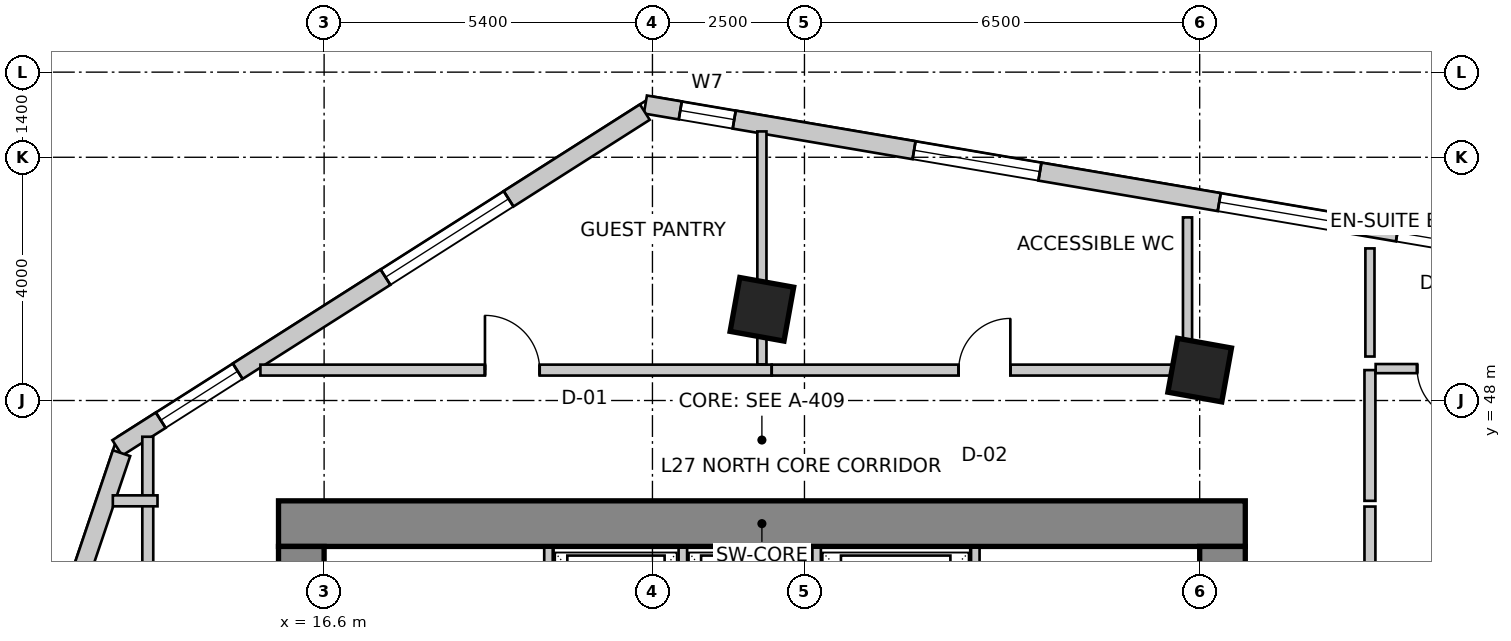
"""IFC4 building model, lengths in metres.
Left out: names, types, materials, properties, quantities, classifications, styles, units other than length and angle.
Written with IfcOpenShell. Run it as: python <this file> out.ifc"""

import sys

from ifc_helpers import new_model, si_unit, direction, frame, frame_2d, origin, origin_2d, place, context, subcontext, project, spatial, rectangle, extrude, source, transform, mapped, element, fill, save


model = new_model("IFC4")
c1 = context("Model", 3, precision=1e-05, world=origin(), true_north=direction((0.0, 1.0)))
c2 = subcontext(c1, "Body", "Model", "MODEL_VIEW")
j1 = project(units=[si_unit("LENGTHUNIT", "METRE"), si_unit("PLANEANGLEUNIT", "RADIAN")], contexts=[c1])
p1 = place(None, origin())
s1 = spatial("IfcSite", under=j1, at=p1, CompositionType="ELEMENT")
p2 = place(p1, origin())
s2 = spatial("IfcBuilding", under=s1, at=p2, CompositionType="ELEMENT")
p3 = place(p2, frame((0.0, 0.0, 114.2)))
s3 = spatial("IfcBuildingStorey", under=s2, at=p3, CompositionType="ELEMENT", Elevation=114.2)
p4 = place(p3, frame((15.85, 45.975, 0.0), z_axis=(0.0, 0.0, 1.0), x_axis=(1.0, 0.0, 0.0)))
e1 = element("IfcWall", 1, at=p4, inside=s3, PredefinedType="SHEAR", context=c2, shape_type="SweptSolid", body=[
    extrude(rectangle(XDim=15.9, YDim=0.75, at=frame_2d((7.95, 0.0))), origin(), (0.0, 0.0, 1.0), 3.6),
])
p5 = place(p3, frame((16.225, 34.2, 0.0), z_axis=(0.0, 0.0, 1.0), x_axis=(0.0, 1.0, 0.0)))
e2 = element("IfcWall", 2, at=p5, inside=s3, PredefinedType="SHEAR", context=c2, shape_type="SweptSolid", body=[
    extrude(rectangle(XDim=11.4, YDim=0.75, at=frame_2d((5.7, 0.0))), origin(), (0.0, 0.0, 1.0), 3.6),
])
m1 = source(origin(), c2, "Body", "SweptSolid", [
    extrude(rectangle(XDim=1.1, YDim=2.15, at=frame_2d((0.55, 1.075))), frame((0.0, 0.385, 0.0), z_axis=(0.0, -1.0, 0.0), x_axis=(1.0, 0.0, 0.0)), (0.0, 0.0, 1.0), 0.77),
])
p6 = place(p5, frame((7.15, 0.0, 0.0)))
e3 = element("IfcOpeningElement", 3, at=p6, cuts=e2, PredefinedType="OPENING", context=c2, shape_type="MappedRepresentation", body=[
    mapped(m1, transform((0.0, 0.0, 0.0), scale=1.0)),
])
p7 = place(p3, frame((31.375, 34.2, 0.0), z_axis=(0.0, 0.0, 1.0), x_axis=(0.0, 1.0, 0.0)))
e4 = element("IfcWall", 4, at=p7, inside=s3, PredefinedType="SHEAR", context=c2, shape_type="SweptSolid", body=[
    extrude(rectangle(XDim=11.4, YDim=0.75, at=frame_2d((5.7, 0.0))), origin(), (0.0, 0.0, 1.0), 3.6),
])
p8 = place(p7, frame((7.35, 0.0, 0.0)))
e5 = element("IfcOpeningElement", 5, at=p8, cuts=e4, PredefinedType="OPENING", context=c2, shape_type="MappedRepresentation", body=[
    mapped(m1, transform((0.0, 0.0, 0.0), scale=1.0)),
])
m2 = source(origin(), c2, "Body", "SweptSolid", [
    extrude(rectangle(XDim=0.9, YDim=0.9, at=origin_2d()), origin(), (0.0, 0.0, 1.0), 3.6),
])
for number, where, z_axis, x_axis in (
    (6, (23.8, 49.5, 0.0), (0.0, 0.0, 1.0), (0.984, -0.177, 0.0)),
    (7, (31.0, 48.5, 0.0), (0.0, 0.0, 1.0), (0.984, -0.177, 0.0)),
):
    element("IfcColumn", number, at=place(p3, frame(where, z_axis=z_axis, x_axis=x_axis)), inside=s3, PredefinedType="COLUMN", context=c2, shape_type="MappedRepresentation", body=[
        mapped(m2, transform((0.0, 0.0, 0.0), scale=1.0)),
    ])
p9 = place(p3, frame((53.561, 47.48, 0.0), z_axis=(0.0, 0.0, 1.0), x_axis=(-0.985845173895, 0.167658262868, 0.0)))
e8 = element("IfcWall", 8, at=p9, inside=s3, PredefinedType="SOLIDWALL", context=c2, shape_type="SweptSolid", body=[
    extrude(rectangle(XDim=32.132, YDim=0.3, at=frame_2d((16.066, 0.0))), origin(), (0.0, 0.0, 1.0), 3.35),
])
m3 = source(origin(), c2, "Body", "SweptSolid", [
    extrude(rectangle(XDim=2.1, YDim=2.0, at=frame_2d((1.05, 1.0))), frame((0.0, 0.16, 0.0), z_axis=(0.0, -1.0, 0.0), x_axis=(1.0, 0.0, 0.0)), (0.0, 0.0, 1.0), 0.32),
])
p10 = place(p9, frame((1.032, 0.0, 0.85)))
e9 = element("IfcOpeningElement", 9, at=p10, cuts=e8, PredefinedType="OPENING", context=c2, shape_type="MappedRepresentation", body=[
    mapped(m3, transform((0.0, 0.0, 0.0), scale=1.0)),
])
p11 = place(p9, frame((4.504, 0.0, 0.85)))
e10 = element("IfcOpeningElement", 10, at=p11, cuts=e8, PredefinedType="OPENING", context=c2, shape_type="MappedRepresentation", body=[
    mapped(m3, transform((0.0, 0.0, 0.0), scale=1.0)),
])
m4 = source(origin(), c2, "Body", "SweptSolid", [
    extrude(rectangle(XDim=1.5, YDim=1.8, at=frame_2d((0.75, 0.9))), frame((0.0, 0.16, 0.0), z_axis=(0.0, -1.0, 0.0), x_axis=(1.0, 0.0, 0.0)), (0.0, 0.0, 1.0), 0.32),
])
p12 = place(p9, frame((7.464, 0.0, 0.85)))
e11 = element("IfcOpeningElement", 11, at=p12, cuts=e8, PredefinedType="OPENING", context=c2, shape_type="MappedRepresentation", body=[
    mapped(m4, transform((0.0, 0.0, 0.0), scale=1.0)),
])
p13 = place(p9, frame((9.824, 0.0, 0.85)))
e12 = element("IfcOpeningElement", 12, at=p13, cuts=e8, PredefinedType="OPENING", context=c2, shape_type="MappedRepresentation", body=[
    mapped(m3, transform((0.0, 0.0, 0.0), scale=1.0)),
])
p14 = place(p9, frame((12.784, 0.0, 0.85)))
e13 = element("IfcOpeningElement", 13, at=p14, cuts=e8, PredefinedType="OPENING", context=c2, shape_type="MappedRepresentation", body=[
    mapped(m4, transform((0.0, 0.0, 0.0), scale=1.0)),
])
p15 = place(p9, frame((15.144, 0.0, 0.85)))
e14 = element("IfcOpeningElement", 14, at=p15, cuts=e8, PredefinedType="OPENING", context=c2, shape_type="MappedRepresentation", body=[
    mapped(m3, transform((0.0, 0.0, 0.0), scale=1.0)),
])
p16 = place(p9, frame((18.086, 0.0, 0.85)))
e15 = element("IfcOpeningElement", 15, at=p16, cuts=e8, PredefinedType="OPENING", context=c2, shape_type="MappedRepresentation", body=[
    mapped(m4, transform((0.0, 0.0, 0.0), scale=1.0)),
])
p17 = place(p9, frame((20.459, 0.0, 0.85)))
e16 = element("IfcOpeningElement", 16, at=p17, cuts=e8, PredefinedType="OPENING", context=c2, shape_type="MappedRepresentation", body=[
    mapped(m3, transform((0.0, 0.0, 0.0), scale=1.0)),
])
p18 = place(p9, frame((25.55, 0.0, 0.85)))
e17 = element("IfcOpeningElement", 17, at=p18, cuts=e8, PredefinedType="OPENING", context=c2, shape_type="MappedRepresentation", body=[
    mapped(m3, transform((0.0, 0.0, 0.0), scale=1.0)),
])
m5 = source(origin(), c2, "Body", "SweptSolid", [
    extrude(rectangle(XDim=0.9, YDim=1.6, at=frame_2d((0.45, 0.8))), frame((0.0, 0.16, 0.0), z_axis=(0.0, -1.0, 0.0), x_axis=(1.0, 0.0, 0.0)), (0.0, 0.0, 1.0), 0.32),
])
p19 = place(p9, frame((30.65, 0.0, 0.85)))
e18 = element("IfcOpeningElement", 18, at=p19, cuts=e8, PredefinedType="OPENING", context=c2, shape_type="MappedRepresentation", body=[
    mapped(m5, transform((0.0, 0.0, 0.0), scale=1.0)),
])
p20 = place(p3, frame((21.875, 52.742, 0.0), z_axis=(0.0, 0.0, 1.0), x_axis=(-0.843662465249, -0.536873956092, 0.0)))
e19 = element("IfcWall", 19, at=p20, inside=s3, PredefinedType="SOLIDWALL", context=c2, shape_type="SweptSolid", body=[
    extrude(rectangle(XDim=10.284, YDim=0.3, at=frame_2d((5.142, 0.0))), origin(), (0.0, 0.0, 1.0), 3.35),
])
m6 = source(origin(), c2, "Body", "SweptSolid", [
    extrude(rectangle(XDim=2.4, YDim=2.2, at=frame_2d((1.2, 1.1))), frame((0.0, 0.16, 0.0), z_axis=(0.0, -1.0, 0.0), x_axis=(1.0, 0.0, 0.0)), (0.0, 0.0, 1.0), 0.32),
])
p21 = place(p20, frame((2.656, 0.0, 0.85)))
e20 = element("IfcOpeningElement", 20, at=p21, cuts=e19, PredefinedType="OPENING", context=c2, shape_type="MappedRepresentation", body=[
    mapped(m6, transform((0.0, 0.0, 0.0), scale=1.0)),
])
p22 = place(p20, frame((7.937, 0.0, 0.85)))
e21 = element("IfcOpeningElement", 21, at=p22, cuts=e19, PredefinedType="OPENING", context=c2, shape_type="MappedRepresentation", body=[
    mapped(m4, transform((0.0, 0.0, 0.0), scale=1.0)),
])
p23 = place(p3, frame((13.269, 47.134, 0.0), z_axis=(0.0, 0.0, 1.0), x_axis=(-0.319929596295, -0.947441319246, 0.0)))
e22 = element("IfcWall", 22, at=p23, inside=s3, PredefinedType="SOLIDWALL", context=c2, shape_type="SweptSolid", body=[
    extrude(rectangle(XDim=16.134, YDim=0.3, at=frame_2d((8.067, 0.0))), origin(), (0.0, 0.0, 1.0), 3.35),
])
p24 = place(p23, frame((2.426, 0.0, 0.85)))
e23 = element("IfcOpeningElement", 23, at=p24, cuts=e22, PredefinedType="OPENING", context=c2, shape_type="MappedRepresentation", body=[
    mapped(m3, transform((0.0, 0.0, 0.0), scale=1.0)),
])
p25 = place(p23, frame((7.211, 0.0, 0.85)))
e24 = element("IfcOpeningElement", 24, at=p25, cuts=e22, PredefinedType="OPENING", context=c2, shape_type="MappedRepresentation", body=[
    mapped(m6, transform((0.0, 0.0, 0.0), scale=1.0)),
])
p26 = place(p23, frame((12.297, 0.0, 0.85)))
e25 = element("IfcOpeningElement", 25, at=p26, cuts=e22, PredefinedType="OPENING", context=c2, shape_type="MappedRepresentation", body=[
    mapped(m3, transform((0.0, 0.0, 0.0), scale=1.0)),
])
for number, where, z_axis, x_axis in (
    (26, (20.29, 43.28, 0.0), (0.0, 0.0, 1.0), (0.0, 1.0, 0.0)),
    (27, (27.31, 43.28, 0.0), (0.0, 0.0, 1.0), (0.0, 1.0, 0.0)),
):
    element("IfcWall", number, at=place(p3, frame(where, z_axis=z_axis, x_axis=x_axis)), inside=s3, PredefinedType="SOLIDWALL", context=c2, shape_type="SweptSolid", body=[
        extrude(rectangle(XDim=2.3, YDim=0.14, at=frame_2d((1.15, 0.0))), origin(), (0.0, 0.0, 1.0), 3.35),
    ])
for number, where, z_axis, x_axis in (
    (28, (22.5, 43.02, 0.0), (0.0, 0.0, 1.0), (0.0, 1.0, 0.0)),
    (29, (24.7, 43.02, 0.0), (0.0, 0.0, 1.0), (0.0, 1.0, 0.0)),
):
    element("IfcWall", number, at=place(p3, frame(where, z_axis=z_axis, x_axis=x_axis)), inside=s3, PredefinedType="SOLIDWALL", context=c2, shape_type="SweptSolid", body=[
        extrude(rectangle(XDim=2.56, YDim=0.14, at=frame_2d((1.28, 0.0))), origin(), (0.0, 0.0, 1.0), 3.35),
    ])
p27 = place(p3, frame((13.7, 33.544, 0.0), z_axis=(0.0, 0.0, 1.0), x_axis=(0.0, 1.0, 0.0)))
e30 = element("IfcWall", 30, at=p27, inside=s3, PredefinedType="PARTITIONING", context=c2, shape_type="SweptSolid", body=[
    extrude(rectangle(XDim=13.86, YDim=0.18, at=frame_2d((6.93, 0.0))), origin(), (0.0, 0.0, 1.0), 2.492),
])
m7 = source(origin(), c2, "Body", "SweptSolid", [
    extrude(rectangle(XDim=0.9, YDim=2.15, at=frame_2d((0.45, 1.075))), frame((0.0, 0.1, 0.0), z_axis=(0.0, -1.0, 0.0), x_axis=(1.0, 0.0, 0.0)), (0.0, 0.0, 1.0), 0.2),
])
p28 = place(p27, frame((4.253, 0.0, 0.0)))
e31 = element("IfcOpeningElement", 31, at=p28, cuts=e30, PredefinedType="OPENING", context=c2, shape_type="MappedRepresentation", body=[
    mapped(m7, transform((0.0, 0.0, 0.0), scale=1.0)),
])
p29 = place(p3, frame((13.86, 46.35, 0.0), z_axis=(0.0, 0.0, 1.0), x_axis=(-1.0, 0.0, 0.0)))
e32 = element("IfcWall", 32, at=p29, inside=s3, PredefinedType="PARTITIONING", context=c2, shape_type="SweptSolid", body=[
    extrude(rectangle(XDim=0.735, YDim=0.18, at=frame_2d((0.367, 0.0))), origin(), (0.0, 0.0, 1.0), 3.35),
])
p30 = place(p3, frame((15.552, 48.5, 0.0), z_axis=(0.0, 0.0, 1.0), x_axis=(1.0, 0.0, 0.0)))
e33 = element("IfcWall", 33, at=p30, inside=s3, PredefinedType="PARTITIONING", context=c2, shape_type="SweptSolid", body=[
    extrude(rectangle(XDim=8.407, YDim=0.18, at=frame_2d((4.204, 0.0))), origin(), (0.0, 0.0, 1.0), 2.935),
])
p31 = place(p30, frame((3.693, 0.0, 0.0)))
e34 = element("IfcOpeningElement", 34, at=p31, cuts=e33, PredefinedType="OPENING", context=c2, shape_type="MappedRepresentation", body=[
    mapped(m7, transform((0.0, 0.0, 0.0), scale=1.0)),
])
p32 = place(p3, frame((23.962, 48.5, 0.0), z_axis=(0.0, 0.0, 1.0), x_axis=(1.0, 0.0, 0.0)))
e35 = element("IfcWall", 35, at=p32, inside=s3, PredefinedType="PARTITIONING", context=c2, shape_type="SweptSolid", body=[
    extrude(rectangle(XDim=6.998, YDim=0.18, at=frame_2d((3.499, 0.0))), origin(), (0.0, 0.0, 1.0), 2.492),
])
m8 = source(origin(), c2, "Body", "SweptSolid", [
    extrude(rectangle(XDim=0.85, YDim=2.15, at=frame_2d((0.425, 1.075))), frame((0.0, 0.1, 0.0), z_axis=(0.0, -1.0, 0.0), x_axis=(1.0, 0.0, 0.0)), (0.0, 0.0, 1.0), 0.2),
])
p33 = place(p32, frame((3.074, 0.0, 0.0)))
e36 = element("IfcOpeningElement", 36, at=p33, cuts=e35, PredefinedType="OPENING", context=c2, shape_type="MappedRepresentation", body=[
    mapped(m8, transform((0.0, 0.0, 0.0), scale=1.0)),
])
p34 = place(p3, frame((33.8, 48.5, 0.0), z_axis=(0.0, 0.0, 1.0), x_axis=(0.0, -1.0, 0.0)))
e37 = element("IfcWall", 37, at=p34, inside=s3, PredefinedType="PARTITIONING", context=c2, shape_type="SweptSolid", body=[
    extrude(rectangle(XDim=2.15, YDim=0.18, at=frame_2d((1.075, 0.0))), origin(), (0.0, 0.0, 1.0), 2.492),
])
p35 = place(p3, frame((33.8, 46.256, 0.0), z_axis=(0.0, 0.0, 1.0), x_axis=(0.0, -1.0, 0.0)))
e38 = element("IfcWall", 38, at=p35, inside=s3, PredefinedType="PARTITIONING", context=c2, shape_type="SweptSolid", body=[
    extrude(rectangle(XDim=8.416, YDim=0.18, at=frame_2d((4.208, 0.0))), origin(), (0.0, 0.0, 1.0), 2.788),
])
p36 = place(p3, frame((23.8, 52.425, 0.0), z_axis=(0.0, 0.0, 1.0), x_axis=(0.0, -1.0, 0.0)))
e39 = element("IfcWall", 39, at=p36, inside=s3, PredefinedType="PARTITIONING", context=c2, shape_type="SweptSolid", body=[
    extrude(rectangle(XDim=3.831, YDim=0.15, at=frame_2d((1.916, 0.0))), origin(), (0.0, 0.0, 1.0), 2.492),
])
p37 = place(p3, frame((36.108, 48.524, 0.0), z_axis=(0.0, 0.0, 1.0), x_axis=(-1.0, 0.0, 0.0)))
e40 = element("IfcWall", 40, at=p37, inside=s3, PredefinedType="PARTITIONING", context=c2, shape_type="SweptSolid", body=[
    extrude(rectangle(XDim=2.214, YDim=0.15, at=frame_2d((1.107, 0.0))), origin(), (0.0, 0.0, 1.0), 3.35),
])
m9 = source(origin(), c2, "Body", "SweptSolid", [
    extrude(rectangle(XDim=0.85, YDim=2.15, at=frame_2d((0.425, 1.075))), frame((0.0, 0.085, 0.0), z_axis=(0.0, -1.0, 0.0), x_axis=(1.0, 0.0, 0.0)), (0.0, 0.0, 1.0), 0.17),
])
p38 = place(p37, frame((0.682, 0.0, 0.0)))
e41 = element("IfcOpeningElement", 41, at=p38, cuts=e40, PredefinedType="OPENING", context=c2, shape_type="MappedRepresentation", body=[
    mapped(m9, transform((0.0, 0.0, 0.0), scale=1.0)),
])
p39 = place(p3, frame((30.8, 51.011, 0.0), z_axis=(0.0, 0.0, 1.0), x_axis=(0.0, -1.0, 0.0)))
e42 = element("IfcWall", 42, at=p39, inside=s3, PredefinedType="PARTITIONING", context=c2, shape_type="SweptSolid", body=[
    extrude(rectangle(XDim=2.292, YDim=0.15, at=frame_2d((1.146, 0.0))), origin(), (0.0, 0.0, 1.0), 3.35),
])
p40 = place(p3, frame((33.8, 48.723, 0.0), z_axis=(0.0, 0.0, 1.0), x_axis=(0.0, 1.0, 0.0)))
e43 = element("IfcWall", 43, at=p40, inside=s3, PredefinedType="PARTITIONING", context=c2, shape_type="SweptSolid", body=[
    extrude(rectangle(XDim=1.778, YDim=0.15, at=frame_2d((0.889, 0.0))), origin(), (0.0, 0.0, 1.0), 3.35),
])
m10 = source(origin(), c2, "Body", "SweptSolid", [
    extrude(rectangle(XDim=1.5, YDim=1.8, at=frame_2d((0.75, 0.9))), frame((0.0, -0.015, 0.0), z_axis=(0.0, -1.0, 0.0), x_axis=(1.0, 0.0, 0.0)), (0.0, 0.0, 1.0), 0.06),
])
p41 = place(p16, origin())
e44 = element("IfcWindow", 44, at=p41, inside=s3, PartitioningType="SINGLE_PANEL", PredefinedType="WINDOW", context=c2, shape_type="MappedRepresentation", body=[
    mapped(m10, transform((0.0, 0.0, 0.0), scale=1.0)),
])
fill(e15, e44)
m11 = source(origin(), c2, "Body", "SweptSolid", [
    extrude(rectangle(XDim=2.1, YDim=2.0, at=frame_2d((1.05, 1.0))), frame((0.0, -0.015, 0.0), z_axis=(0.0, -1.0, 0.0), x_axis=(1.0, 0.0, 0.0)), (0.0, 0.0, 1.0), 0.06),
])
p42 = place(p17, origin())
e45 = element("IfcWindow", 45, at=p42, inside=s3, PartitioningType="SINGLE_PANEL", PredefinedType="WINDOW", context=c2, shape_type="MappedRepresentation", body=[
    mapped(m11, transform((0.0, 0.0, 0.0), scale=1.0)),
])
fill(e16, e45)
p43 = place(p18, origin())
e46 = element("IfcWindow", 46, at=p43, inside=s3, PartitioningType="SINGLE_PANEL", PredefinedType="WINDOW", context=c2, shape_type="MappedRepresentation", body=[
    mapped(m11, transform((0.0, 0.0, 0.0), scale=1.0)),
])
fill(e17, e46)
m12 = source(origin(), c2, "Body", "SweptSolid", [
    extrude(rectangle(XDim=0.9, YDim=1.6, at=frame_2d((0.45, 0.8))), frame((0.0, -0.015, 0.0), z_axis=(0.0, -1.0, 0.0), x_axis=(1.0, 0.0, 0.0)), (0.0, 0.0, 1.0), 0.06),
])
p44 = place(p19, origin())
e47 = element("IfcWindow", 47, at=p44, inside=s3, PartitioningType="SINGLE_PANEL", PredefinedType="WINDOW", context=c2, shape_type="MappedRepresentation", body=[
    mapped(m12, transform((0.0, 0.0, 0.0), scale=1.0)),
])
fill(e18, e47)
m13 = source(origin(), c2, "Body", "SweptSolid", [
    extrude(rectangle(XDim=2.4, YDim=2.2, at=frame_2d((1.2, 1.1))), frame((0.0, -0.015, 0.0), z_axis=(0.0, -1.0, 0.0), x_axis=(1.0, 0.0, 0.0)), (0.0, 0.0, 1.0), 0.06),
])
p45 = place(p21, origin())
e48 = element("IfcWindow", 48, at=p45, inside=s3, PartitioningType="SINGLE_PANEL", PredefinedType="WINDOW", context=c2, shape_type="MappedRepresentation", body=[
    mapped(m13, transform((0.0, 0.0, 0.0), scale=1.0)),
])
fill(e20, e48)
p46 = place(p22, origin())
e49 = element("IfcWindow", 49, at=p46, inside=s3, PartitioningType="SINGLE_PANEL", PredefinedType="WINDOW", context=c2, shape_type="MappedRepresentation", body=[
    mapped(m10, transform((0.0, 0.0, 0.0), scale=1.0)),
])
fill(e21, e49)
m14 = source(origin(), c2, "Body", "SweptSolid", [
    extrude(rectangle(XDim=0.9, YDim=2.15, at=frame_2d((0.45, 1.075))), frame((0.0, 0.025, 0.0), z_axis=(0.0, -1.0, 0.0), x_axis=(1.0, 0.0, 0.0)), (0.0, 0.0, 1.0), 0.05),
])
p47 = place(p31, origin())
e50 = element("IfcDoor", 50, at=p47, inside=s3, OperationType="SINGLE_SWING_LEFT", PredefinedType="DOOR", context=c2, shape_type="MappedRepresentation", body=[
    mapped(m14, transform((0.0, 0.0, 0.0), scale=1.0)),
])
fill(e34, e50)
m15 = source(origin(), c2, "Body", "SweptSolid", [
    extrude(rectangle(XDim=0.85, YDim=2.15, at=frame_2d((0.425, 1.075))), frame((0.0, 0.025, 0.0), z_axis=(0.0, -1.0, 0.0), x_axis=(1.0, 0.0, 0.0)), (0.0, 0.0, 1.0), 0.05),
])
p48 = place(p33, origin())
e51 = element("IfcDoor", 51, at=p48, inside=s3, OperationType="SINGLE_SWING_RIGHT", PredefinedType="DOOR", context=c2, shape_type="MappedRepresentation", body=[
    mapped(m15, transform((0.0, 0.0, 0.0), scale=1.0)),
])
fill(e36, e51)
p49 = place(p38, origin())
e52 = element("IfcDoor", 52, at=p49, inside=s3, OperationType="SINGLE_SWING_LEFT", PredefinedType="DOOR", context=c2, shape_type="MappedRepresentation", body=[
    mapped(m15, transform((0.0, 0.0, 0.0), scale=1.0)),
])
fill(e41, e52)
save(model, sys.argv[1])
